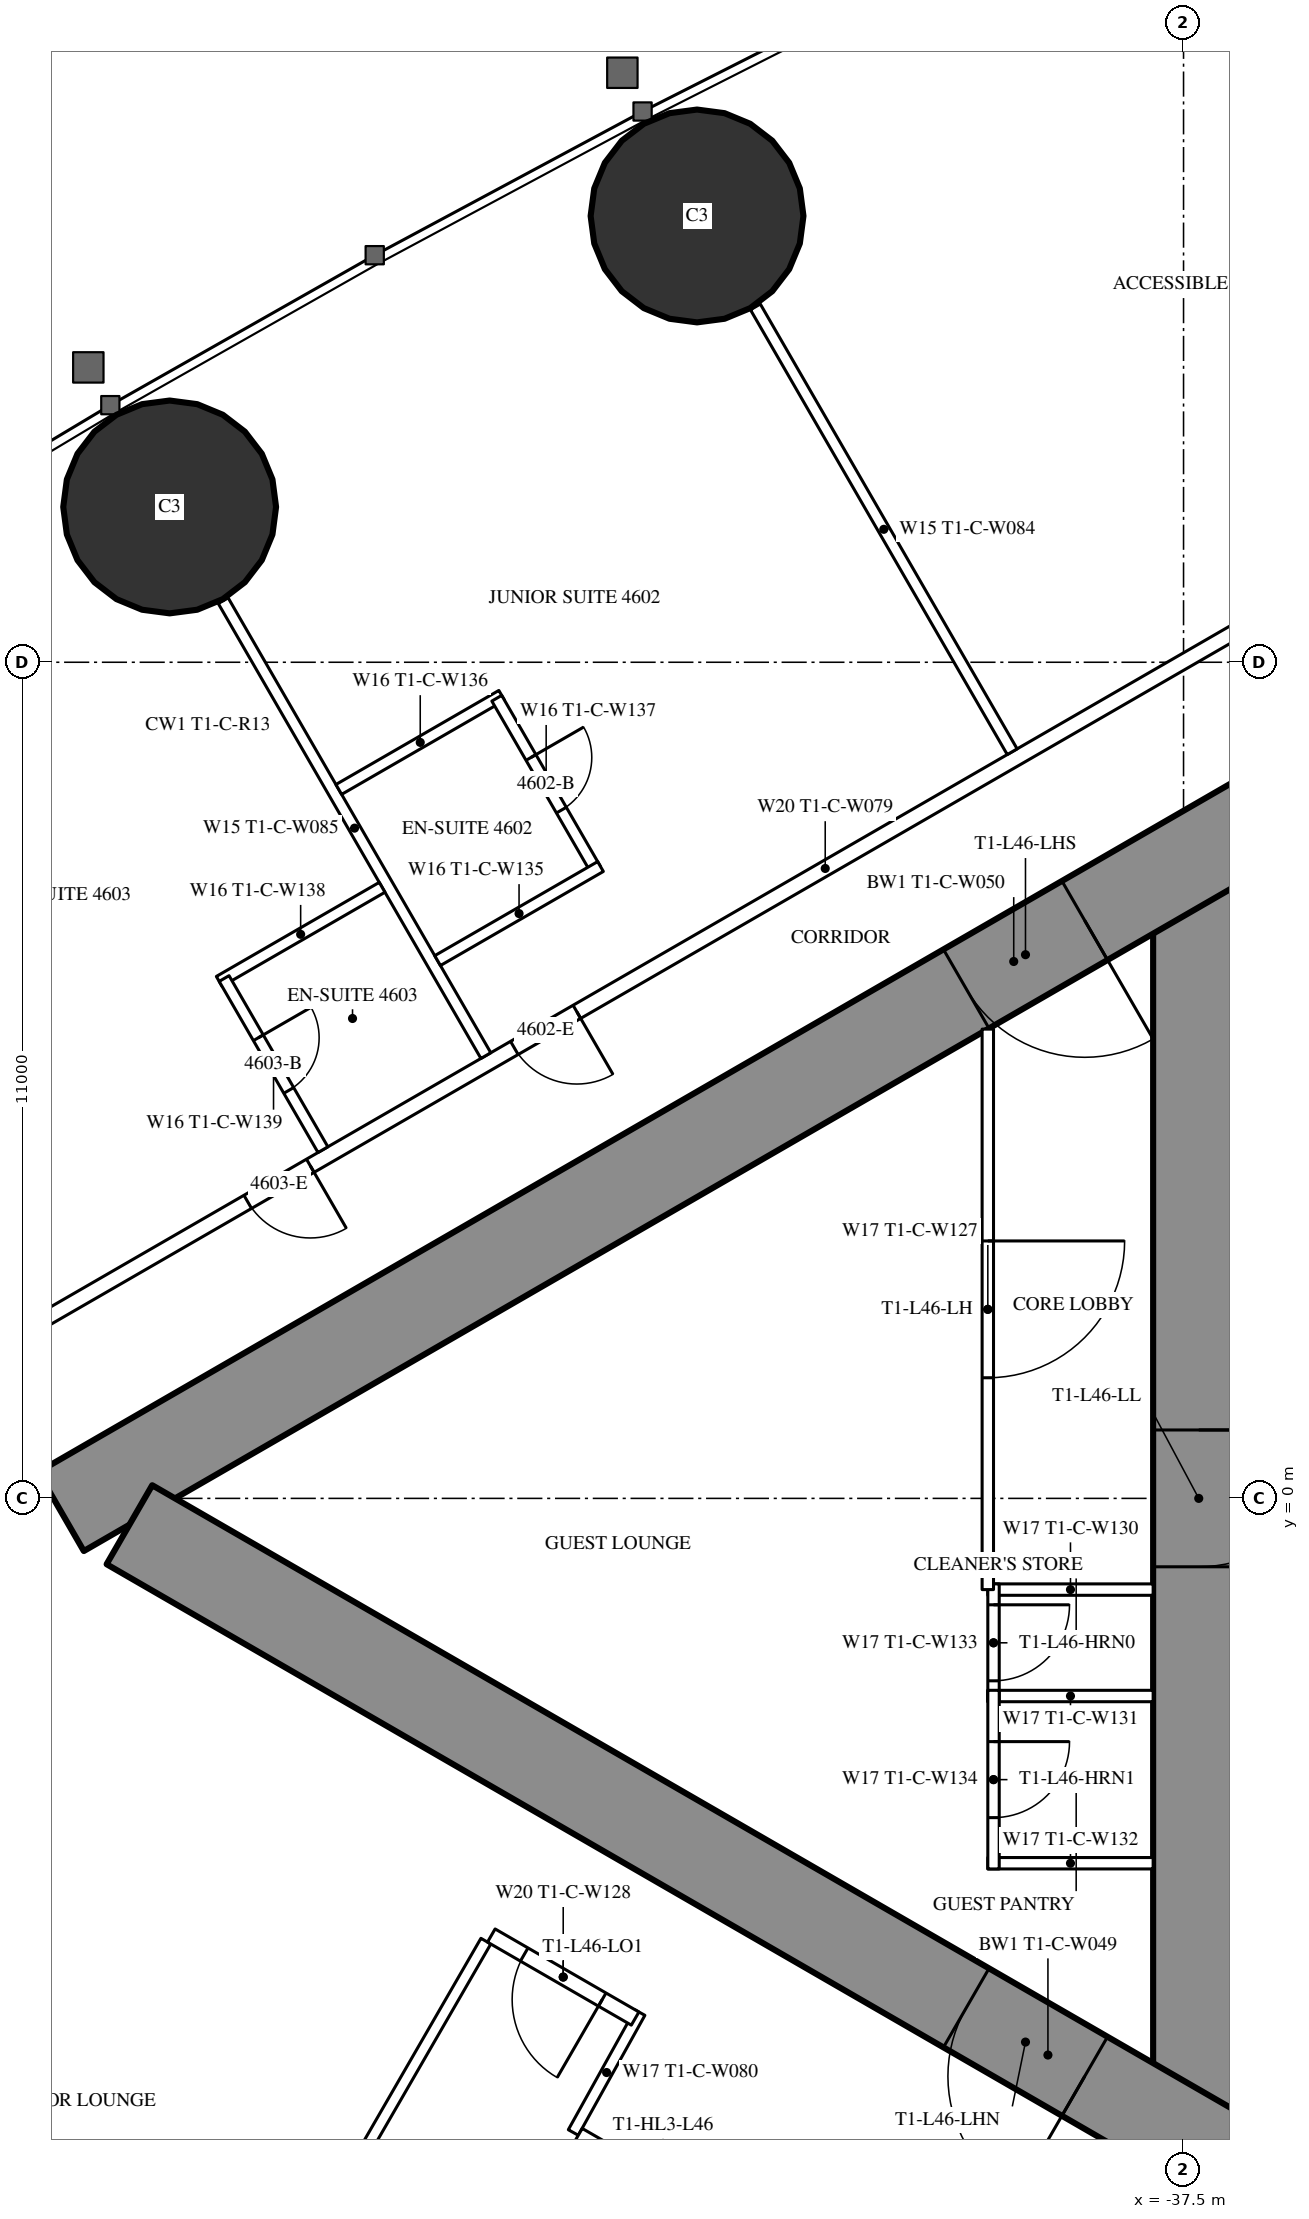
"""IFC4 building model, lengths in metres.
Left out: names, types, materials, properties, quantities, classifications, styles, units other than length and angle.
Written with IfcOpenShell. Run it as: python <this file> out.ifc"""

import sys

from ifc_helpers import new_model, si_unit, direction, frame, frame_2d, origin, origin_2d, place, context, subcontext, project, spatial, rectangle, circle, extrude, element, fill, save


model = new_model("IFC4")
c1 = context("Model", 3, precision=1e-05, world=origin(), true_north=direction((0.0, 1.0)))
c2 = subcontext(c1, "Body", "Model", "MODEL_VIEW")
j1 = project(units=[si_unit("LENGTHUNIT", "METRE"), si_unit("PLANEANGLEUNIT", "RADIAN")], contexts=[c1])
p1 = place(None, origin())
s1 = spatial("IfcSite", under=j1, at=p1, CompositionType="ELEMENT")
p2 = place(p1, origin())
s2 = spatial("IfcBuilding", under=s1, at=p2, CompositionType="ELEMENT")
p3 = place(p2, frame((0.0, 0.0, 173.8)))
s3 = spatial("IfcBuildingStorey", under=s2, at=p3, CompositionType="ELEMENT", Elevation=173.8)
for number, where, z_axis, x_axis in (
    (1, (-43.9, 16.871, 0.0), (0.0, 0.0, 1.0), (1.0, 0.0, 0.0)),
    (2, (-50.839, 13.043, 0.0), (0.0, 0.0, 1.0), (1.0, 0.0, 0.0)),
):
    element("IfcColumn", number, at=place(p3, frame(where, z_axis=z_axis, x_axis=x_axis)), inside=s3, PredefinedType="COLUMN", context=c2, shape_type="SweptSolid", body=[
        extrude(circle(Radius=1.4, at=origin_2d()), origin(), (0.0, 0.0, 1.0), 3.5),
    ])
p4 = place(p3, frame((-37.3, 8.6, 0.0), z_axis=(0.0, 0.0, 1.0), x_axis=(0.0, -1.0, 0.0)))
e3 = element("IfcWall", 3, at=p4, inside=s3, PredefinedType="SHEAR", context=c2, shape_type="SweptSolid", body=[
    extrude(rectangle(XDim=17.2, YDim=1.2, at=frame_2d((8.6, 0.0))), origin(), (0.0, 0.0, 1.0), 3.5),
])
p5 = place(p4, frame((7.7, 0.0, 0.0)))
e4 = element("IfcOpeningElement", 4, at=p5, cuts=e3, PredefinedType="OPENING", context=c2, shape_type="SweptSolid", body=[
    extrude(rectangle(XDim=1.8, YDim=2.2, at=frame_2d((0.9, 1.1))), frame((0.0, 0.61, 0.0), z_axis=(0.0, -1.0, 0.0), x_axis=(1.0, 0.0, 0.0)), (0.0, 0.0, 1.0), 1.22),
])
p6 = place(p3, frame((-27.2, 14.3, 0.0), z_axis=(0.0, 0.0, 1.0), x_axis=(-0.866026593062, -0.499997940104, 0.0)))
e5 = element("IfcWall", 5, at=p6, inside=s3, PredefinedType="SHEAR", context=c2, shape_type="SweptSolid", body=[
    extrude(rectangle(XDim=28.946, YDim=1.2, at=frame_2d((14.473, 0.0))), origin(), (0.0, 0.0, 1.0), 3.5),
])
p7 = place(p6, frame((4.6, 0.0, 0.0)))
e6 = element("IfcOpeningElement", 6, at=p7, cuts=e5, PredefinedType="OPENING", context=c2, shape_type="SweptSolid", body=[
    extrude(rectangle(XDim=1.0, YDim=2.2, at=frame_2d((0.5, 1.1))), frame((0.0, 0.61, 0.0), z_axis=(0.0, -1.0, 0.0), x_axis=(1.0, 0.0, 0.0)), (0.0, 0.0, 1.0), 1.22),
])
p8 = place(p6, frame((13.395, 0.0, 0.0)))
e7 = element("IfcOpeningElement", 7, at=p8, cuts=e5, PredefinedType="OPENING", context=c2, shape_type="SweptSolid", body=[
    extrude(rectangle(XDim=1.8, YDim=2.2, at=frame_2d((0.9, 1.1))), frame((0.0, 0.61, 0.0), z_axis=(0.0, -1.0, 0.0), x_axis=(1.0, 0.0, 0.0)), (0.0, 0.0, 1.0), 1.22),
])
p9 = place(p3, frame((-27.2, -14.3, 0.0), z_axis=(0.0, 0.0, 1.0), x_axis=(-0.866024021859, 0.500002393557, 0.0)))
e8 = element("IfcWall", 8, at=p9, inside=s3, PredefinedType="SHEAR", context=c2, shape_type="SweptSolid", body=[
    extrude(rectangle(XDim=27.907, YDim=1.2, at=frame_2d((13.954, 0.0))), origin(), (0.0, 0.0, 1.0), 3.5),
])
p10 = place(p9, frame((4.6, 0.0, 0.0)))
e9 = element("IfcOpeningElement", 9, at=p10, cuts=e8, PredefinedType="OPENING", context=c2, shape_type="SweptSolid", body=[
    extrude(rectangle(XDim=1.0, YDim=2.2, at=frame_2d((0.5, 1.1))), frame((0.0, 0.61, 0.0), z_axis=(0.0, -1.0, 0.0), x_axis=(1.0, 0.0, 0.0)), (0.0, 0.0, 1.0), 1.22),
])
p11 = place(p9, frame((13.395, 0.0, 0.0)))
e10 = element("IfcOpeningElement", 10, at=p11, cuts=e8, PredefinedType="OPENING", context=c2, shape_type="SweptSolid", body=[
    extrude(rectangle(XDim=1.8, YDim=2.2, at=frame_2d((0.9, 1.1))), frame((0.0, 0.61, 0.0), z_axis=(0.0, -1.0, 0.0), x_axis=(1.0, 0.0, 0.0)), (0.0, 0.0, 1.0), 1.22),
])
p12 = place(p3, frame((-27.86, 16.575, 0.0), z_axis=(0.0, 0.0, 1.0), x_axis=(-0.866025533911, -0.499999774615, 0.0)))
e11 = element("IfcWall", 11, at=p12, inside=s3, PredefinedType="PARTITIONING", context=c2, shape_type="SweptSolid", body=[
    extrude(rectangle(XDim=33.149, YDim=0.2, at=frame_2d((16.575, 0.0))), origin(), (0.0, 0.0, 1.0), 3.25),
])
p13 = place(p12, frame((3.75, 0.0, 0.0)))
e12 = element("IfcOpeningElement", 12, at=p13, cuts=e11, PredefinedType="OPENING", context=c2, shape_type="SweptSolid", body=[
    extrude(rectangle(XDim=1.0, YDim=2.2, at=frame_2d((0.5, 1.1))), frame((0.0, 0.11, 0.0), z_axis=(0.0, -1.0, 0.0), x_axis=(1.0, 0.0, 0.0)), (0.0, 0.0, 1.0), 0.22),
])
p14 = place(p12, frame((20.347, 0.0, 0.0)))
e13 = element("IfcOpeningElement", 13, at=p14, cuts=e11, PredefinedType="OPENING", context=c2, shape_type="SweptSolid", body=[
    extrude(rectangle(XDim=0.95, YDim=2.2, at=frame_2d((0.475, 1.1))), frame((0.0, 0.11, 0.0), z_axis=(0.0, -1.0, 0.0), x_axis=(1.0, 0.0, 0.0)), (0.0, 0.0, 1.0), 0.22),
])
p15 = place(p12, frame((24.397, 0.0, 0.0)))
e14 = element("IfcOpeningElement", 14, at=p15, cuts=e11, PredefinedType="OPENING", context=c2, shape_type="SweptSolid", body=[
    extrude(rectangle(XDim=0.95, YDim=2.2, at=frame_2d((0.475, 1.1))), frame((0.0, 0.11, 0.0), z_axis=(0.0, -1.0, 0.0), x_axis=(1.0, 0.0, 0.0)), (0.0, 0.0, 1.0), 0.22),
])
p16 = place(p12, frame((30.042, 0.0, 0.0)))
e15 = element("IfcOpeningElement", 15, at=p16, cuts=e11, PredefinedType="OPENING", context=c2, shape_type="SweptSolid", body=[
    extrude(rectangle(XDim=0.95, YDim=2.2, at=frame_2d((0.475, 1.1))), frame((0.0, 0.11, 0.0), z_axis=(0.0, -1.0, 0.0), x_axis=(1.0, 0.0, 0.0)), (0.0, 0.0, 1.0), 0.22),
])
p17 = place(p3, frame((-39.754, 9.823, 0.0), z_axis=(0.0, 0.0, 1.0), x_axis=(-0.499997670926, 0.866026748472, 0.0)))
e16 = element("IfcWall", 16, at=p17, inside=s3, PredefinedType="PARTITIONING", context=c2, shape_type="SweptSolid", body=[
    extrude(rectangle(XDim=6.757, YDim=0.15, at=frame_2d((3.379, 0.0))), origin(), (0.0, 0.0, 1.0), 2.3),
])
for number, where, z_axis, x_axis in (
    (17, (-46.679, 5.825, 0.0), (0.0, 0.0, 1.0), (-0.5, 0.866, 0.0)),
    (18, (-46.679, -5.825, 0.0), (0.0, 0.0, 1.0), (-0.5, -0.866, 0.0)),
):
    element("IfcWall", number, at=place(p3, frame(where, z_axis=z_axis, x_axis=x_axis)), inside=s3, PredefinedType="PARTITIONING", context=c2, shape_type="SweptSolid", body=[
        extrude(rectangle(XDim=6.911, YDim=0.15, at=frame_2d((3.456, 0.0))), origin(), (0.0, 0.0, 1.0), 2.3),
    ])
p18 = place(p3, frame((-44.652, -6.764, 0.0), z_axis=(0.0, 0.0, 1.0), x_axis=(-0.485424724123, -0.874278466629, 0.0)))
e19 = element("IfcWall", 19, at=p18, inside=s3, PredefinedType="PARTITIONING", context=c2, shape_type="SweptSolid", body=[
    extrude(rectangle(XDim=1.805, YDim=0.15, at=frame_2d((0.903, 0.0))), origin(), (0.0, 0.0, 1.0), 3.25),
])
p19 = place(p3, frame((-44.715, -6.844, 0.0), z_axis=(0.0, 0.0, 1.0), x_axis=(-0.865999496279, 0.500044870432, 0.0)))
e20 = element("IfcWall", 20, at=p19, inside=s3, PredefinedType="PARTITIONING", context=c2, shape_type="SweptSolid", body=[
    extrude(rectangle(XDim=2.185, YDim=0.2, at=frame_2d((1.092, 0.0))), origin(), (0.0, 0.0, 1.0), 3.25),
])
p20 = place(p19, frame((0.5, 0.0, 0.0)))
e21 = element("IfcOpeningElement", 21, at=p20, cuts=e20, PredefinedType="OPENING", context=c2, shape_type="SweptSolid", body=[
    extrude(rectangle(XDim=1.185, YDim=2.2, at=frame_2d((0.593, 1.1))), frame((0.0, 0.11, 0.0), z_axis=(0.0, -1.0, 0.0), x_axis=(1.0, 0.0, 0.0)), (0.0, 0.0, 1.0), 0.22),
])
p21 = place(p3, frame((-46.47, 10.564, 0.0), z_axis=(0.0, 0.0, 1.0), x_axis=(-0.866006523861, -0.500032699561, 0.0)))
e22 = element("IfcWall", 22, at=p21, inside=s3, PredefinedType="PARTITIONING", context=c2, shape_type="SweptSolid", body=[
    extrude(rectangle(XDim=2.475, YDim=0.15, at=frame_2d((1.237, 0.0))), origin(), (0.0, 0.0, 1.0), 3.25),
])
p22 = place(p3, frame((-45.235, 8.275, 0.0), z_axis=(0.0, 0.0, 1.0), x_axis=(-0.500006934395, 0.866021400173, 0.0)))
e23 = element("IfcWall", 23, at=p22, inside=s3, PredefinedType="PARTITIONING", context=c2, shape_type="SweptSolid", body=[
    extrude(rectangle(XDim=2.6, YDim=0.15, at=frame_2d((1.3, 0.0))), origin(), (0.0, 0.0, 1.0), 3.25),
])
p23 = place(p22, frame((0.9, 0.0, 0.0)))
e24 = element("IfcOpeningElement", 24, at=p23, cuts=e23, PredefinedType="OPENING", context=c2, shape_type="SweptSolid", body=[
    extrude(rectangle(XDim=0.8, YDim=2.2, at=frame_2d((0.4, 1.1))), frame((0.0, 0.085, 0.0), z_axis=(0.0, -1.0, 0.0), x_axis=(1.0, 0.0, 0.0)), (0.0, 0.0, 1.0), 0.17),
])
for number, where, z_axis, x_axis in (
    (25, (-45.17, 8.312, 0.0), (0.0, 0.0, 1.0), (-0.866, -0.5, 0.0)),
    (26, (-48.044, 8.039, 0.0), (0.0, 0.0, 1.0), (-0.866, -0.5, 0.0)),
):
    element("IfcWall", number, at=place(p3, frame(where, z_axis=z_axis, x_axis=x_axis)), inside=s3, PredefinedType="PARTITIONING", context=c2, shape_type="SweptSolid", body=[
        extrude(rectangle(XDim=2.475, YDim=0.15, at=frame_2d((1.238, 0.0))), origin(), (0.0, 0.0, 1.0), 3.25),
    ])
p24 = place(p3, frame((-48.822, 4.588, 0.0), z_axis=(0.0, 0.0, 1.0), x_axis=(-0.500006934395, 0.866021400173, 0.0)))
e27 = element("IfcWall", 27, at=p24, inside=s3, PredefinedType="PARTITIONING", context=c2, shape_type="SweptSolid", body=[
    extrude(rectangle(XDim=2.6, YDim=0.15, at=frame_2d((1.3, 0.0))), origin(), (0.0, 0.0, 1.0), 3.25),
])
p25 = place(p24, frame((0.9, 0.0, 0.0)))
e28 = element("IfcOpeningElement", 28, at=p25, cuts=e27, PredefinedType="OPENING", context=c2, shape_type="SweptSolid", body=[
    extrude(rectangle(XDim=0.8, YDim=2.2, at=frame_2d((0.4, 1.1))), frame((0.0, 0.085, 0.0), z_axis=(0.0, -1.0, 0.0), x_axis=(1.0, 0.0, 0.0)), (0.0, 0.0, 1.0), 0.17),
])
for number, where, z_axis, x_axis in (
    (29, (-37.9, -1.2, 0.0), (0.0, 0.0, 1.0), (-1.0, 0.0, 0.0)),
    (30, (-37.9, -2.6, 0.0), (0.0, 0.0, 1.0), (-1.0, 0.0, 0.0)),
    (31, (-37.9, -4.8, 0.0), (0.0, 0.0, 1.0), (-1.0, 0.0, 0.0)),
):
    element("IfcWall", number, at=place(p3, frame(where, z_axis=z_axis, x_axis=x_axis)), inside=s3, PredefinedType="PARTITIONING", context=c2, shape_type="SweptSolid", body=[
        extrude(rectangle(XDim=2.175, YDim=0.15, at=frame_2d((1.087, 0.0))), origin(), (0.0, 0.0, 1.0), 3.25),
    ])
p26 = place(p3, frame((-40.0, -1.125, 0.0), z_axis=(0.0, 0.0, 1.0), x_axis=(0.0, -1.0, 0.0)))
e32 = element("IfcWall", 32, at=p26, inside=s3, PredefinedType="PARTITIONING", context=c2, shape_type="SweptSolid", body=[
    extrude(rectangle(XDim=1.55, YDim=0.15, at=frame_2d((0.775, 0.0))), origin(), (0.0, 0.0, 1.0), 3.25),
])
p27 = place(p26, frame((0.275, 0.0, 0.0)))
e33 = element("IfcOpeningElement", 33, at=p27, cuts=e32, PredefinedType="OPENING", context=c2, shape_type="SweptSolid", body=[
    extrude(rectangle(XDim=1.0, YDim=2.2, at=frame_2d((0.5, 1.1))), frame((0.0, 0.085, 0.0), z_axis=(0.0, -1.0, 0.0), x_axis=(1.0, 0.0, 0.0)), (0.0, 0.0, 1.0), 0.17),
])
p28 = place(p3, frame((-40.0, -2.525, 0.0), z_axis=(0.0, 0.0, 1.0), x_axis=(0.0, -1.0, 0.0)))
e34 = element("IfcWall", 34, at=p28, inside=s3, PredefinedType="PARTITIONING", context=c2, shape_type="SweptSolid", body=[
    extrude(rectangle(XDim=2.35, YDim=0.15, at=frame_2d((1.175, 0.0))), origin(), (0.0, 0.0, 1.0), 3.25),
])
p29 = place(p28, frame((0.675, 0.0, 0.0)))
e35 = element("IfcOpeningElement", 35, at=p29, cuts=e34, PredefinedType="OPENING", context=c2, shape_type="SweptSolid", body=[
    extrude(rectangle(XDim=1.0, YDim=2.2, at=frame_2d((0.5, 1.1))), frame((0.0, 0.085, 0.0), z_axis=(0.0, -1.0, 0.0), x_axis=(1.0, 0.0, 0.0)), (0.0, 0.0, 1.0), 0.17),
])
p30 = place(p3, frame((-40.075, 6.174, 0.0), z_axis=(0.0, 0.0, 1.0), x_axis=(0.0, -1.0, 0.0)))
e36 = element("IfcWall", 36, at=p30, inside=s3, PredefinedType="PARTITIONING", context=c2, shape_type="SweptSolid", body=[
    extrude(rectangle(XDim=7.374, YDim=0.15, at=frame_2d((3.687, 0.0))), origin(), (0.0, 0.0, 1.0), 3.25),
])
p31 = place(p30, frame((2.787, 0.0, 0.0)))
e37 = element("IfcOpeningElement", 37, at=p31, cuts=e36, PredefinedType="OPENING", context=c2, shape_type="SweptSolid", body=[
    extrude(rectangle(XDim=1.8, YDim=2.2, at=frame_2d((0.9, 1.1))), frame((0.0, 0.085, 0.0), z_axis=(0.0, -1.0, 0.0), x_axis=(1.0, 0.0, 0.0)), (0.0, 0.0, 1.0), 0.17),
])
p32 = place(p3, frame((-39.758, -11.697, 0.0), z_axis=(0.0, 0.0, 1.0), x_axis=(-0.866024194504, 0.500002094529, 0.0)))
e38 = element("IfcWall", 38, at=p32, inside=s3, PredefinedType="PARTITIONING", context=c2, shape_type="SweptSolid", body=[
    extrude(rectangle(XDim=6.6, YDim=0.25, at=frame_2d((3.3, 0.0))), origin(), (0.0, 0.0, 1.0), 3.25),
])
p33 = place(p32, frame((0.75, 0.0, 0.0)))
e39 = element("IfcOpeningElement", 39, at=p33, cuts=e38, PredefinedType="OPENING", context=c2, shape_type="SweptSolid", body=[
    extrude(rectangle(XDim=1.1, YDim=2.2, at=frame_2d((0.55, 1.1))), frame((0.0, 0.135, 0.0), z_axis=(0.0, -1.0, 0.0), x_axis=(1.0, 0.0, 0.0)), (0.0, 0.0, 1.0), 0.27),
])
p34 = place(p32, frame((2.75, 0.0, 0.0)))
e40 = element("IfcOpeningElement", 40, at=p34, cuts=e38, PredefinedType="OPENING", context=c2, shape_type="SweptSolid", body=[
    extrude(rectangle(XDim=1.1, YDim=2.2, at=frame_2d((0.55, 1.1))), frame((0.0, 0.135, 0.0), z_axis=(0.0, -1.0, 0.0), x_axis=(1.0, 0.0, 0.0)), (0.0, 0.0, 1.0), 0.27),
])
p35 = place(p32, frame((4.75, 0.0, 0.0)))
e41 = element("IfcOpeningElement", 41, at=p35, cuts=e38, PredefinedType="OPENING", context=c2, shape_type="SweptSolid", body=[
    extrude(rectangle(XDim=1.1, YDim=2.2, at=frame_2d((0.55, 1.1))), frame((0.0, 0.135, 0.0), z_axis=(0.0, -1.0, 0.0), x_axis=(1.0, 0.0, 0.0)), (0.0, 0.0, 1.0), 0.27),
])
p36 = place(p23, origin())
e42 = element("IfcDoor", 42, at=p36, inside=s3, OperationType="SINGLE_SWING_RIGHT", PredefinedType="DOOR", context=c2, shape_type="SweptSolid", body=[
    extrude(rectangle(XDim=0.8, YDim=2.2, at=frame_2d((0.4, 1.1))), frame((0.0, 0.025, 0.0), z_axis=(0.0, -1.0, 0.0), x_axis=(1.0, 0.0, 0.0)), (0.0, 0.0, 1.0), 0.05),
])
fill(e24, e42)
p37 = place(p14, origin())
e43 = element("IfcDoor", 43, at=p37, inside=s3, OperationType="SINGLE_SWING_LEFT", PredefinedType="DOOR", context=c2, shape_type="SweptSolid", body=[
    extrude(rectangle(XDim=0.95, YDim=2.2, at=frame_2d((0.475, 1.1))), frame((0.0, 0.025, 0.0), z_axis=(0.0, -1.0, 0.0), x_axis=(1.0, 0.0, 0.0)), (0.0, 0.0, 1.0), 0.05),
])
fill(e13, e43)
p38 = place(p25, origin())
e44 = element("IfcDoor", 44, at=p38, inside=s3, OperationType="SINGLE_SWING_RIGHT", PredefinedType="DOOR", context=c2, shape_type="SweptSolid", body=[
    extrude(rectangle(XDim=0.8, YDim=2.2, at=frame_2d((0.4, 1.1))), frame((0.0, 0.025, 0.0), z_axis=(0.0, -1.0, 0.0), x_axis=(1.0, 0.0, 0.0)), (0.0, 0.0, 1.0), 0.05),
])
fill(e28, e44)
p39 = place(p15, origin())
e45 = element("IfcDoor", 45, at=p39, inside=s3, OperationType="SINGLE_SWING_LEFT", PredefinedType="DOOR", context=c2, shape_type="SweptSolid", body=[
    extrude(rectangle(XDim=0.95, YDim=2.2, at=frame_2d((0.475, 1.1))), frame((0.0, 0.025, 0.0), z_axis=(0.0, -1.0, 0.0), x_axis=(1.0, 0.0, 0.0)), (0.0, 0.0, 1.0), 0.05),
])
fill(e14, e45)
p40 = place(p20, origin())
e46 = element("IfcDoor", 46, at=p40, inside=s3, OperationType="SINGLE_SWING_LEFT", PredefinedType="DOOR", context=c2, shape_type="SweptSolid", body=[
    extrude(rectangle(XDim=1.185, YDim=2.2, at=frame_2d((0.593, 1.1))), frame((0.0, 0.025, 0.0), z_axis=(0.0, -1.0, 0.0), x_axis=(1.0, 0.0, 0.0)), (0.0, 0.0, 1.0), 0.05),
])
fill(e21, e46)
p41 = place(p27, origin())
e47 = element("IfcDoor", 47, at=p41, inside=s3, OperationType="SINGLE_SWING_LEFT", PredefinedType="DOOR", context=c2, shape_type="SweptSolid", body=[
    extrude(rectangle(XDim=1.0, YDim=2.2, at=frame_2d((0.5, 1.1))), frame((0.0, 0.025, 0.0), z_axis=(0.0, -1.0, 0.0), x_axis=(1.0, 0.0, 0.0)), (0.0, 0.0, 1.0), 0.05),
])
fill(e33, e47)
p42 = place(p29, origin())
e48 = element("IfcDoor", 48, at=p42, inside=s3, OperationType="SINGLE_SWING_LEFT", PredefinedType="DOOR", context=c2, shape_type="SweptSolid", body=[
    extrude(rectangle(XDim=1.0, YDim=2.2, at=frame_2d((0.5, 1.1))), frame((0.0, 0.025, 0.0), z_axis=(0.0, -1.0, 0.0), x_axis=(1.0, 0.0, 0.0)), (0.0, 0.0, 1.0), 0.05),
])
fill(e35, e48)
p43 = place(p31, origin())
e49 = element("IfcDoor", 49, at=p43, inside=s3, OperationType="DOUBLE_DOOR_SINGLE_SWING", PredefinedType="DOOR", context=c2, shape_type="SweptSolid", body=[
    extrude(rectangle(XDim=1.8, YDim=2.2, at=frame_2d((0.9, 1.1))), frame((0.0, 0.025, 0.0), z_axis=(0.0, -1.0, 0.0), x_axis=(1.0, 0.0, 0.0)), (0.0, 0.0, 1.0), 0.05),
])
fill(e37, e49)
p44 = place(p8, origin())
e50 = element("IfcDoor", 50, at=p44, inside=s3, OperationType="DOUBLE_DOOR_SINGLE_SWING", PredefinedType="DOOR", context=c2, shape_type="SweptSolid", body=[
    extrude(rectangle(XDim=1.8, YDim=2.2, at=frame_2d((0.9, 1.1))), frame((0.0, 0.025, 0.0), z_axis=(0.0, -1.0, 0.0), x_axis=(1.0, 0.0, 0.0)), (0.0, 0.0, 1.0), 0.05),
])
fill(e7, e50)
p45 = place(p11, origin())
e51 = element("IfcDoor", 51, at=p45, inside=s3, OperationType="DOUBLE_DOOR_SINGLE_SWING", PredefinedType="DOOR", context=c2, shape_type="SweptSolid", body=[
    extrude(rectangle(XDim=1.8, YDim=2.2, at=frame_2d((0.9, 1.1))), frame((0.0, 0.025, 0.0), z_axis=(0.0, -1.0, 0.0), x_axis=(1.0, 0.0, 0.0)), (0.0, 0.0, 1.0), 0.05),
])
fill(e10, e51)
p46 = place(p5, origin())
e52 = element("IfcDoor", 52, at=p46, inside=s3, OperationType="DOUBLE_DOOR_SINGLE_SWING", PredefinedType="DOOR", context=c2, shape_type="SweptSolid", body=[
    extrude(rectangle(XDim=1.8, YDim=2.2, at=frame_2d((0.9, 1.1))), frame((0.0, 0.025, 0.0), z_axis=(0.0, -1.0, 0.0), x_axis=(1.0, 0.0, 0.0)), (0.0, 0.0, 1.0), 0.05),
])
fill(e4, e52)
save(model, sys.argv[1])
